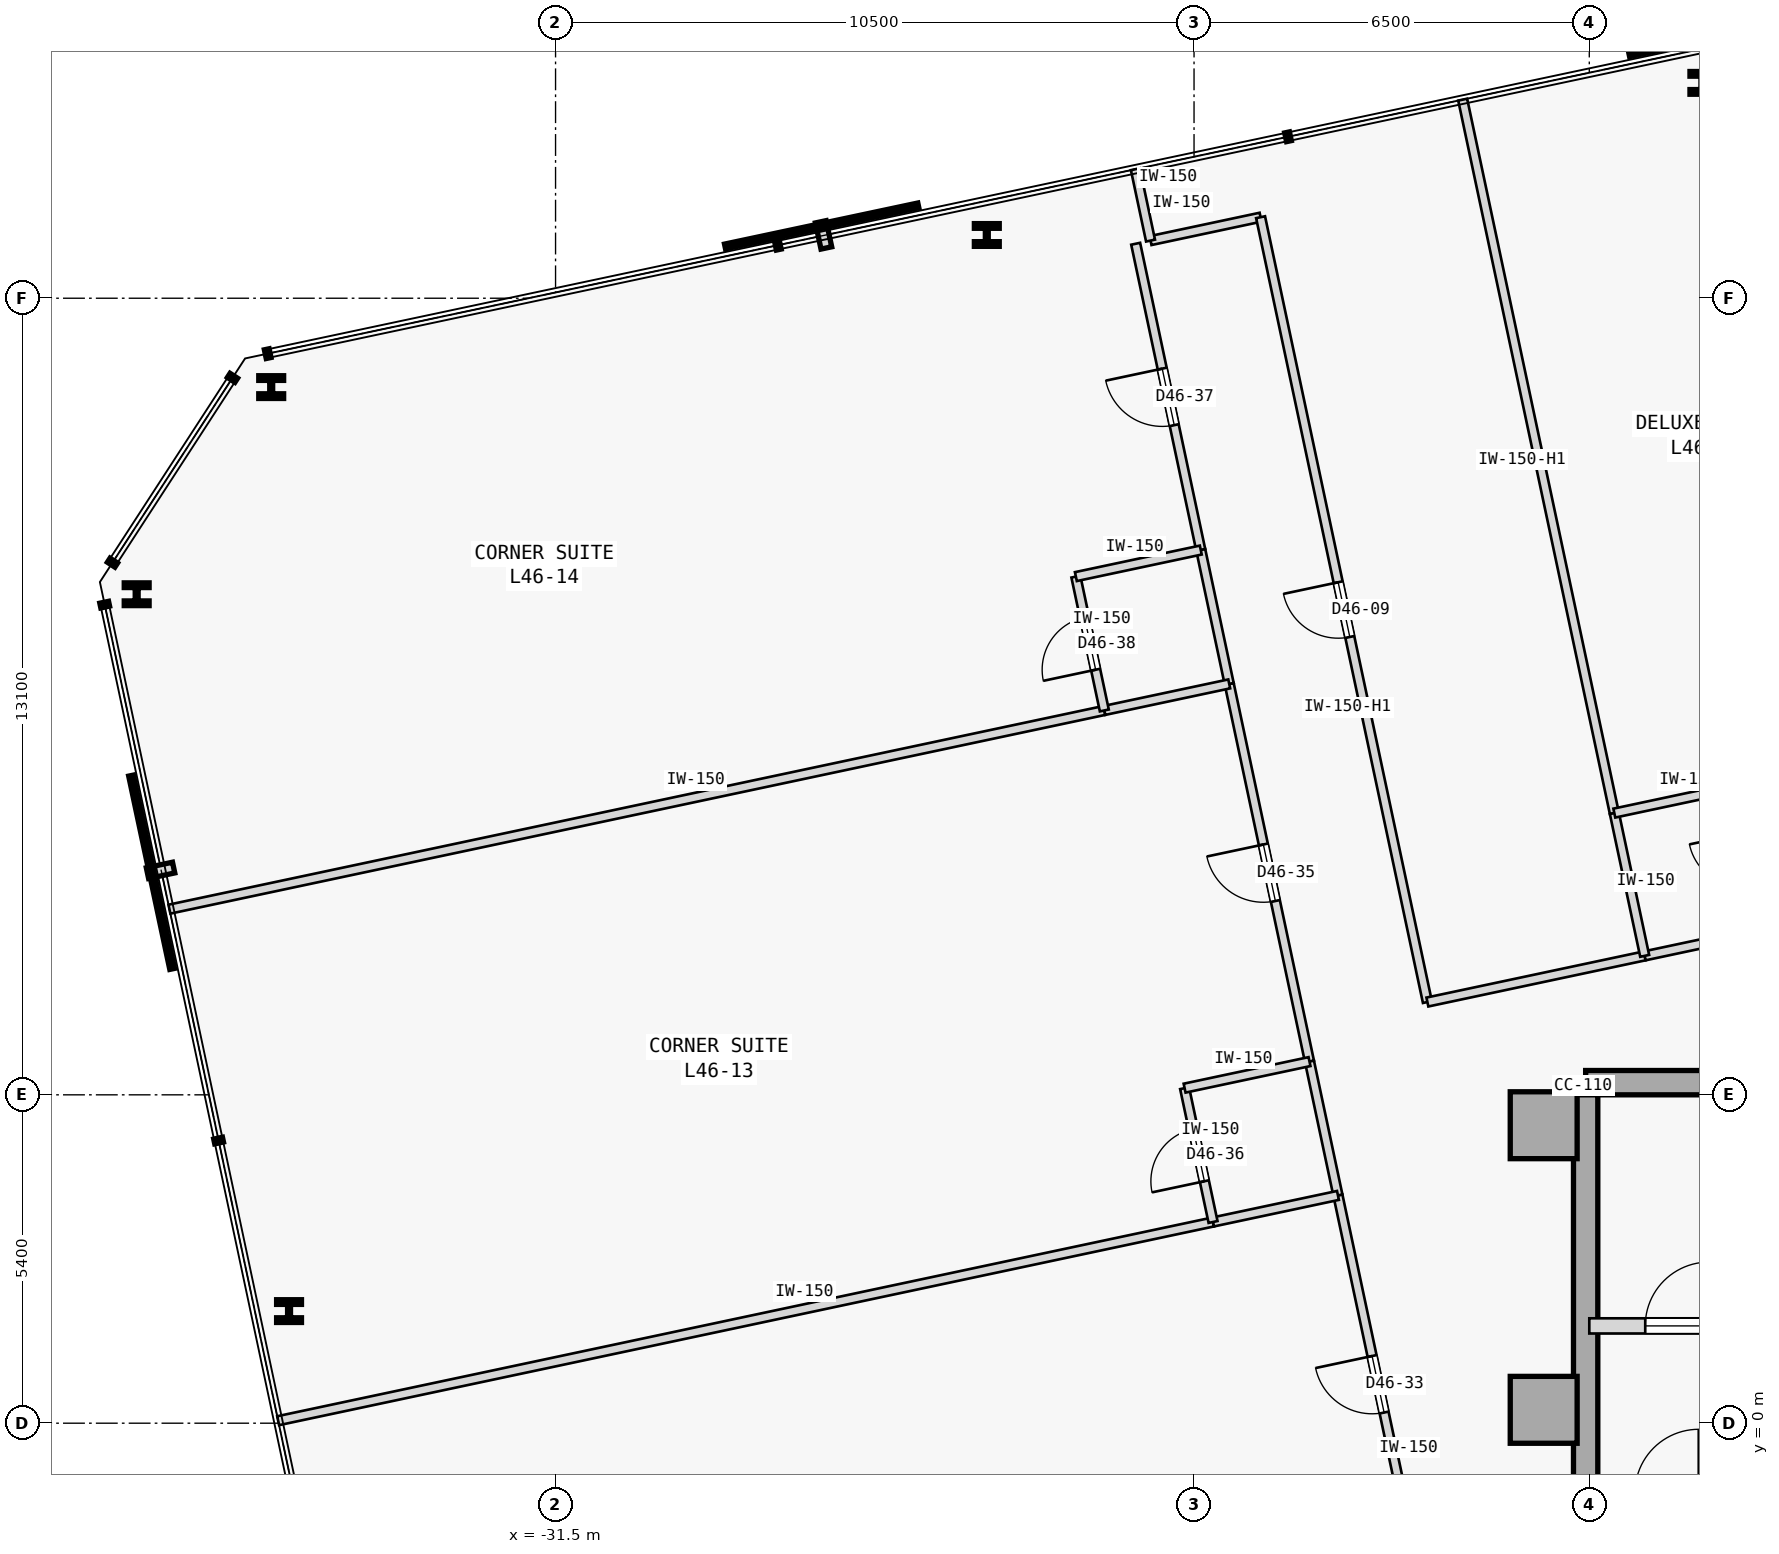
"""IFC4 building model, lengths in metres.
Left out: names, types, materials, properties, quantities, classifications, styles, units other than length and angle.
Written with IfcOpenShell. Run it as: python <this file> out.ifc"""

import sys

from ifc_helpers import new_model, si_unit, direction, frame, frame_2d, origin, origin_2d, place, context, subcontext, project, spatial, rectangle, i_section, extrude, element, fill, save


model = new_model("IFC4")
c1 = context("Model", 3, precision=1e-05, world=origin(), true_north=direction((0.0, 1.0)))
c2 = subcontext(c1, "Body", "Model", "MODEL_VIEW")
j1 = project(units=[si_unit("LENGTHUNIT", "METRE"), si_unit("PLANEANGLEUNIT", "RADIAN")], contexts=[c1])
p1 = place(None, origin())
s1 = spatial("IfcSite", under=j1, at=p1, CompositionType="ELEMENT")
p2 = place(p1, origin())
s2 = spatial("IfcBuilding", under=s1, at=p2, CompositionType="ELEMENT")
p3 = place(p2, frame((0.0, 0.0, 178.6)))
s3 = spatial("IfcBuildingStorey", under=s2, at=p3, CompositionType="ELEMENT", Elevation=178.6)
for number, where, z_axis, x_axis in (
    (1, (-15.25, 4.9, 0.0), (0.0, 0.0, 1.0), (1.0, 0.0, 0.0)),
    (2, (-15.25, 0.22, 0.0), (0.0, 0.0, 1.0), (1.0, 0.0, 0.0)),
):
    element("IfcColumn", number, at=place(p3, frame(where, z_axis=z_axis, x_axis=x_axis)), inside=s3, PredefinedType="COLUMN", context=c2, shape_type="SweptSolid", body=[
        extrude(rectangle(XDim=1.1, YDim=1.1, at=origin_2d()), origin(), (0.0, 0.0, 1.0), 3.4),
    ])
p4 = place(p3, frame((-14.56, 5.6, 0.0), z_axis=(0.0, 0.0, 1.0), x_axis=(1.0, 0.0, 0.0)))
e3 = element("IfcWall", 3, at=p4, inside=s3, PredefinedType="SHEAR", context=c2, shape_type="SweptSolid", body=[
    extrude(rectangle(XDim=11.41, YDim=0.4, at=frame_2d((5.705, 0.0))), origin(), (0.0, 0.0, 1.0), 3.175),
])
p5 = place(p3, frame((-14.56, -5.4, 0.0), z_axis=(0.0, 0.0, 1.0), x_axis=(0.0, 1.0, 0.0)))
e4 = element("IfcWall", 4, at=p5, inside=s3, PredefinedType="SHEAR", context=c2, shape_type="SweptSolid", body=[
    extrude(rectangle(XDim=10.8, YDim=0.4, at=frame_2d((5.4, 0.0))), origin(), (0.0, 0.0, 1.0), 3.175),
])
for number, where, z_axis, x_axis in (
    (5, (-12.64, 22.042, 0.0), (0.0, 0.0, 1.0), (1.0, 0.0, 0.0)),
    (6, (-24.408, 19.54, 0.0), (0.0, 0.0, 1.0), (1.0, 0.0, 0.0)),
    (7, (-36.176, 17.039, 0.0), (0.0, 0.0, 1.0), (1.0, 0.0, 0.0)),
    (8, (-38.389, 13.632, 0.0), (0.0, 0.0, 1.0), (1.0, 0.0, 0.0)),
    (9, (-35.883, 1.844, 0.0), (0.0, 0.0, 1.0), (1.0, 0.0, 0.0)),
):
    element("IfcColumn", number, at=place(p3, frame(where, z_axis=z_axis, x_axis=x_axis)), inside=s3, PredefinedType="COLUMN", context=c2, shape_type="SweptSolid", body=[
        extrude(i_section(OverallWidth=0.409, OverallDepth=0.374, WebThickness=0.048, FlangeThickness=0.077, FilletRadius=0.015, at=origin_2d()), origin(), (0.0, 0.0, 1.0), 3.4),
    ])
p6 = place(p3, frame((-14.5, 1.6, 0.0), z_axis=(0.0, 0.0, 1.0), x_axis=(1.0, 0.0, 0.0)))
e10 = element("IfcWall", 10, at=p6, inside=s3, PredefinedType="STANDARD", context=c2, shape_type="SweptSolid", body=[
    extrude(rectangle(XDim=3.6, YDim=0.25, at=frame_2d((1.8, 0.0))), origin(), (0.0, 0.0, 1.0), 3.175),
])
p7 = place(p6, frame((0.92, 0.0, 0.0)))
e11 = element("IfcOpeningElement", 11, at=p7, cuts=e10, PredefinedType="OPENING", context=c2, shape_type="SweptSolid", body=[
    extrude(rectangle(XDim=1.05, YDim=2.15, at=frame_2d((0.525, 1.075))), frame((0.0, 0.135, 0.0), z_axis=(0.0, -1.0, 0.0), x_axis=(1.0, 0.0, 0.0)), (0.0, 0.0, 1.0), 0.27),
])
p8 = place(p3, frame((-21.715, 19.448, 0.0), z_axis=(0.0, 0.0, 1.0), x_axis=(0.978160192495, 0.207852442415, 0.0)))
e12 = element("IfcWall", 12, at=p8, inside=s3, PredefinedType="PARTITIONING", context=c2, shape_type="SweptSolid", body=[
    extrude(rectangle(XDim=1.85, YDim=0.15, at=frame_2d((0.925, 0.0))), origin(), (0.0, 0.0, 1.0), 3.175),
])
p9 = place(p3, frame((-17.162, 6.926, 0.0), z_axis=(0.0, 0.0, 1.0), x_axis=(-0.207911421929, 0.978147657888, 0.0)))
e13 = element("IfcWall", 13, at=p9, inside=s3, PredefinedType="PARTITIONING", context=c2, shape_type="SweptSolid", body=[
    extrude(rectangle(XDim=13.195, YDim=0.15, at=frame_2d((6.598, 0.0))), origin(), (0.0, 0.0, 1.0), 2.725),
])
p10 = place(p9, frame((6.137, 0.0, 0.0)))
e14 = element("IfcOpeningElement", 14, at=p10, cuts=e13, PredefinedType="OPENING", context=c2, shape_type="SweptSolid", body=[
    extrude(rectangle(XDim=0.92, YDim=2.15, at=frame_2d((0.46, 1.075))), frame((0.0, 0.085, 0.0), z_axis=(0.0, -1.0, 0.0), x_axis=(1.0, 0.0, 0.0)), (0.0, 0.0, 1.0), 0.17),
])
p11 = place(p3, frame((-17.162, 6.926, 0.0), z_axis=(0.0, 0.0, 1.0), x_axis=(0.978147299501, 0.207913108004, 0.0)))
e15 = element("IfcWall", 15, at=p11, inside=s3, PredefinedType="PARTITIONING", context=c2, shape_type="SweptSolid", body=[
    extrude(rectangle(XDim=3.653, YDim=0.15, at=frame_2d((1.827, 0.0))), origin(), (0.0, 0.0, 1.0), 3.175),
])
p12 = place(p3, frame((-13.589, 7.685, 0.0), z_axis=(0.0, 0.0, 1.0), x_axis=(0.97811873796, 0.208047433175, 0.0)))
e16 = element("IfcWall", 16, at=p12, inside=s3, PredefinedType="PARTITIONING", context=c2, shape_type="SweptSolid", body=[
    extrude(rectangle(XDim=1.981, YDim=0.15, at=frame_2d((0.99, 0.0))), origin(), (0.0, 0.0, 1.0), 3.175),
])
p13 = place(p3, frame((-17.313, -2.466, 0.0), z_axis=(0.0, 0.0, 1.0), x_axis=(-0.207916691923, 0.978146537703, 0.0)))
e17 = element("IfcWall", 17, at=p13, inside=s3, PredefinedType="PARTITIONING", context=c2, shape_type="SweptSolid", body=[
    extrude(rectangle(XDim=6.35, YDim=0.15, at=frame_2d((3.175, 0.0))), origin(), (0.0, 0.0, 1.0), 3.175),
])
p14 = place(p13, frame((2.7, 0.0, 0.0)))
e18 = element("IfcOpeningElement", 18, at=p14, cuts=e17, PredefinedType="OPENING", context=c2, shape_type="SweptSolid", body=[
    extrude(rectangle(XDim=0.95, YDim=2.15, at=frame_2d((0.475, 1.075))), frame((0.0, 0.085, 0.0), z_axis=(0.0, -1.0, 0.0), x_axis=(1.0, 0.0, 0.0)), (0.0, 0.0, 1.0), 0.17),
])
p15 = place(p3, frame((-19.101, 5.946, 0.0), z_axis=(0.0, 0.0, 1.0), x_axis=(-0.207916691923, 0.978146537703, 0.0)))
e19 = element("IfcWall", 19, at=p15, inside=s3, PredefinedType="PARTITIONING", context=c2, shape_type="SweptSolid", body=[
    extrude(rectangle(XDim=6.35, YDim=0.15, at=frame_2d((3.175, 0.0))), origin(), (0.0, 0.0, 1.0), 3.175),
])
p16 = place(p15, frame((2.7, 0.0, 0.0)))
e20 = element("IfcOpeningElement", 20, at=p16, cuts=e19, PredefinedType="OPENING", context=c2, shape_type="SweptSolid", body=[
    extrude(rectangle(XDim=0.95, YDim=2.15, at=frame_2d((0.475, 1.075))), frame((0.0, 0.085, 0.0), z_axis=(0.0, -1.0, 0.0), x_axis=(1.0, 0.0, 0.0)), (0.0, 0.0, 1.0), 0.17),
])
p17 = place(p3, frame((-18.633, 3.746, 0.0), z_axis=(0.0, 0.0, 1.0), x_axis=(-0.207913264065, 0.978147266328, 0.0)))
e21 = element("IfcWall", 21, at=p17, inside=s3, PredefinedType="PARTITIONING", context=c2, shape_type="SweptSolid", body=[
    extrude(rectangle(XDim=2.25, YDim=0.15, at=frame_2d((1.125, 0.0))), origin(), (0.0, 0.0, 1.0), 3.175),
])
p18 = place(p3, frame((-20.889, 14.358, 0.0), z_axis=(0.0, 0.0, 1.0), x_axis=(-0.207916584961, 0.978146560439, 0.0)))
e22 = element("IfcWall", 22, at=p18, inside=s3, PredefinedType="PARTITIONING", context=c2, shape_type="SweptSolid", body=[
    extrude(rectangle(XDim=5.15, YDim=0.15, at=frame_2d((2.575, 0.0))), origin(), (0.0, 0.0, 1.0), 3.175),
])
p19 = place(p18, frame((2.1, 0.0, 0.0)))
e23 = element("IfcOpeningElement", 23, at=p19, cuts=e22, PredefinedType="OPENING", context=c2, shape_type="SweptSolid", body=[
    extrude(rectangle(XDim=0.95, YDim=2.15, at=frame_2d((0.475, 1.075))), frame((0.0, 0.085, 0.0), z_axis=(0.0, -1.0, 0.0), x_axis=(1.0, 0.0, 0.0)), (0.0, 0.0, 1.0), 0.17),
])
p20 = place(p3, frame((-20.421, 12.158, 0.0), z_axis=(0.0, 0.0, 1.0), x_axis=(-0.207913264065, 0.978147266328, 0.0)))
e24 = element("IfcWall", 24, at=p20, inside=s3, PredefinedType="PARTITIONING", context=c2, shape_type="SweptSolid", body=[
    extrude(rectangle(XDim=2.25, YDim=0.15, at=frame_2d((1.125, 0.0))), origin(), (0.0, 0.0, 1.0), 3.175),
])
p21 = place(p3, frame((-14.088, 10.033, 0.0), z_axis=(0.0, 0.0, 1.0), x_axis=(-0.207910848762, 0.978147779718, 0.0)))
e25 = element("IfcWall", 25, at=p21, inside=s3, PredefinedType="PARTITIONING", context=c2, shape_type="SweptSolid", body=[
    extrude(rectangle(XDim=11.995, YDim=0.15, at=frame_2d((5.998, 0.0))), origin(), (0.0, 0.0, 1.0), 2.725),
])
p22 = place(p3, frame((-13.589, 7.685, 0.0), z_axis=(0.0, 0.0, 1.0), x_axis=(-0.207917150959, 0.978146440129, 0.0)))
e26 = element("IfcWall", 26, at=p22, inside=s3, PredefinedType="PARTITIONING", context=c2, shape_type="SweptSolid", body=[
    extrude(rectangle(XDim=2.4, YDim=0.15, at=frame_2d((1.2, 0.0))), origin(), (0.0, 0.0, 1.0), 3.175),
])
p23 = place(p3, frame((-21.715, 19.448, 0.0), z_axis=(0.0, 0.0, 1.0), x_axis=(-0.20795853359, 0.978137642823, 0.0)))
e27 = element("IfcWall", 27, at=p23, inside=s3, PredefinedType="PARTITIONING", context=c2, shape_type="SweptSolid", body=[
    extrude(rectangle(XDim=1.2, YDim=0.15, at=frame_2d((0.6, 0.0))), origin(), (0.0, 0.0, 1.0), 3.175),
])
p24 = place(p3, frame((-14.088, 10.033, 0.0), z_axis=(0.0, 0.0, 1.0), x_axis=(0.978149140323, 0.20790444749, 0.0)))
e28 = element("IfcWall", 28, at=p24, inside=s3, PredefinedType="PARTITIONING", context=c2, shape_type="SweptSolid", body=[
    extrude(rectangle(XDim=1.981, YDim=0.15, at=frame_2d((0.99, 0.0))), origin(), (0.0, 0.0, 1.0), 3.175),
])
p25 = place(p3, frame((-36.062, 0.041, 0.0), z_axis=(0.0, 0.0, 1.0), x_axis=(0.978149296727, 0.207903711638, 0.0)))
e29 = element("IfcWall", 29, at=p25, inside=s3, PredefinedType="PARTITIONING", context=c2, shape_type="SweptSolid", body=[
    extrude(rectangle(XDim=15.718, YDim=0.15, at=frame_2d((7.859, 0.0))), origin(), (0.0, 0.0, 1.0), 3.175),
])
p26 = place(p3, frame((-20.688, 3.309, 0.0), z_axis=(0.0, 0.0, 1.0), x_axis=(0.978134617382, 0.207972763311, 0.0)))
e30 = element("IfcWall", 30, at=p26, inside=s3, PredefinedType="PARTITIONING", context=c2, shape_type="SweptSolid", body=[
    extrude(rectangle(XDim=2.1, YDim=0.15, at=frame_2d((1.05, 0.0))), origin(), (0.0, 0.0, 1.0), 3.175),
])
p27 = place(p3, frame((-20.688, 3.309, 0.0), z_axis=(0.0, 0.0, 1.0), x_axis=(-0.207891197838, 0.978151956427, 0.0)))
e31 = element("IfcWall", 31, at=p27, inside=s3, PredefinedType="PARTITIONING", context=c2, shape_type="SweptSolid", body=[
    extrude(rectangle(XDim=2.25, YDim=0.15, at=frame_2d((1.125, 0.0))), origin(), (0.0, 0.0, 1.0), 3.175),
])
p28 = place(p27, frame((0.685, 0.0, 0.0)))
e32 = element("IfcOpeningElement", 32, at=p28, cuts=e31, PredefinedType="OPENING", context=c2, shape_type="SweptSolid", body=[
    extrude(rectangle(XDim=0.88, YDim=2.15, at=frame_2d((0.44, 1.075))), frame((0.0, 0.085, 0.0), z_axis=(0.0, -1.0, 0.0), x_axis=(1.0, 0.0, 0.0)), (0.0, 0.0, 1.0), 0.17),
])
p29 = place(p3, frame((-21.155, 5.51, 0.0), z_axis=(0.0, 0.0, 1.0), x_axis=(0.97815826, 0.207861536591, 0.0)))
e33 = element("IfcWall", 33, at=p29, inside=s3, PredefinedType="PARTITIONING", context=c2, shape_type="SweptSolid", body=[
    extrude(rectangle(XDim=2.1, YDim=0.15, at=frame_2d((1.05, 0.0))), origin(), (0.0, 0.0, 1.0), 3.175),
])
p30 = place(p3, frame((-37.85, 8.453, 0.0), z_axis=(0.0, 0.0, 1.0), x_axis=(0.978149296727, 0.207903711638, 0.0)))
e34 = element("IfcWall", 34, at=p30, inside=s3, PredefinedType="PARTITIONING", context=c2, shape_type="SweptSolid", body=[
    extrude(rectangle(XDim=15.718, YDim=0.15, at=frame_2d((7.859, 0.0))), origin(), (0.0, 0.0, 1.0), 3.175),
])
p31 = place(p3, frame((-22.476, 11.721, 0.0), z_axis=(0.0, 0.0, 1.0), x_axis=(0.978134617382, 0.207972763311, 0.0)))
e35 = element("IfcWall", 35, at=p31, inside=s3, PredefinedType="PARTITIONING", context=c2, shape_type="SweptSolid", body=[
    extrude(rectangle(XDim=2.1, YDim=0.15, at=frame_2d((1.05, 0.0))), origin(), (0.0, 0.0, 1.0), 3.175),
])
p32 = place(p3, frame((-22.476, 11.721, 0.0), z_axis=(0.0, 0.0, 1.0), x_axis=(-0.207891197838, 0.978151956427, 0.0)))
e36 = element("IfcWall", 36, at=p32, inside=s3, PredefinedType="PARTITIONING", context=c2, shape_type="SweptSolid", body=[
    extrude(rectangle(XDim=2.25, YDim=0.15, at=frame_2d((1.125, 0.0))), origin(), (0.0, 0.0, 1.0), 3.175),
])
p33 = place(p32, frame((0.685, 0.0, 0.0)))
e37 = element("IfcOpeningElement", 37, at=p33, cuts=e36, PredefinedType="OPENING", context=c2, shape_type="SweptSolid", body=[
    extrude(rectangle(XDim=0.88, YDim=2.15, at=frame_2d((0.44, 1.075))), frame((0.0, 0.085, 0.0), z_axis=(0.0, -1.0, 0.0), x_axis=(1.0, 0.0, 0.0)), (0.0, 0.0, 1.0), 0.17),
])
p34 = place(p3, frame((-22.943, 13.922, 0.0), z_axis=(0.0, 0.0, 1.0), x_axis=(0.97815826, 0.207861536591, 0.0)))
e38 = element("IfcWall", 38, at=p34, inside=s3, PredefinedType="PARTITIONING", context=c2, shape_type="SweptSolid", body=[
    extrude(rectangle(XDim=2.1, YDim=0.15, at=frame_2d((1.05, 0.0))), origin(), (0.0, 0.0, 1.0), 3.175),
])
p35 = place(p7, origin())
e39 = element("IfcDoor", 39, at=p35, inside=s3, OperationType="SINGLE_SWING_RIGHT", PredefinedType="DOOR", context=c2, shape_type="SweptSolid", body=[
    extrude(rectangle(XDim=1.05, YDim=2.15, at=frame_2d((0.525, 1.075))), frame((0.0, 0.025, 0.0), z_axis=(0.0, -1.0, 0.0), x_axis=(1.0, 0.0, 0.0)), (0.0, 0.0, 1.0), 0.05),
])
fill(e11, e39)
p36 = place(p10, origin())
e40 = element("IfcDoor", 40, at=p36, inside=s3, OperationType="SINGLE_SWING_RIGHT", PredefinedType="DOOR", context=c2, shape_type="SweptSolid", body=[
    extrude(rectangle(XDim=0.92, YDim=2.15, at=frame_2d((0.46, 1.075))), frame((0.0, 0.025, 0.0), z_axis=(0.0, -1.0, 0.0), x_axis=(1.0, 0.0, 0.0)), (0.0, 0.0, 1.0), 0.05),
])
fill(e14, e40)
p37 = place(p14, origin())
e41 = element("IfcDoor", 41, at=p37, inside=s3, OperationType="SINGLE_SWING_RIGHT", PredefinedType="DOOR", context=c2, shape_type="SweptSolid", body=[
    extrude(rectangle(XDim=0.95, YDim=2.15, at=frame_2d((0.475, 1.075))), frame((0.0, 0.025, 0.0), z_axis=(0.0, -1.0, 0.0), x_axis=(1.0, 0.0, 0.0)), (0.0, 0.0, 1.0), 0.05),
])
fill(e18, e41)
p38 = place(p16, origin())
e42 = element("IfcDoor", 42, at=p38, inside=s3, OperationType="SINGLE_SWING_RIGHT", PredefinedType="DOOR", context=c2, shape_type="SweptSolid", body=[
    extrude(rectangle(XDim=0.95, YDim=2.15, at=frame_2d((0.475, 1.075))), frame((0.0, 0.025, 0.0), z_axis=(0.0, -1.0, 0.0), x_axis=(1.0, 0.0, 0.0)), (0.0, 0.0, 1.0), 0.05),
])
fill(e20, e42)
p39 = place(p28, origin())
e43 = element("IfcDoor", 43, at=p39, inside=s3, OperationType="SINGLE_SWING_LEFT", PredefinedType="DOOR", context=c2, shape_type="SweptSolid", body=[
    extrude(rectangle(XDim=0.88, YDim=2.15, at=frame_2d((0.44, 1.075))), frame((0.0, 0.025, 0.0), z_axis=(0.0, -1.0, 0.0), x_axis=(1.0, 0.0, 0.0)), (0.0, 0.0, 1.0), 0.05),
])
fill(e32, e43)
p40 = place(p19, origin())
e44 = element("IfcDoor", 44, at=p40, inside=s3, OperationType="SINGLE_SWING_RIGHT", PredefinedType="DOOR", context=c2, shape_type="SweptSolid", body=[
    extrude(rectangle(XDim=0.95, YDim=2.15, at=frame_2d((0.475, 1.075))), frame((0.0, 0.025, 0.0), z_axis=(0.0, -1.0, 0.0), x_axis=(1.0, 0.0, 0.0)), (0.0, 0.0, 1.0), 0.05),
])
fill(e23, e44)
p41 = place(p33, origin())
e45 = element("IfcDoor", 45, at=p41, inside=s3, OperationType="SINGLE_SWING_LEFT", PredefinedType="DOOR", context=c2, shape_type="SweptSolid", body=[
    extrude(rectangle(XDim=0.88, YDim=2.15, at=frame_2d((0.44, 1.075))), frame((0.0, 0.025, 0.0), z_axis=(0.0, -1.0, 0.0), x_axis=(1.0, 0.0, 0.0)), (0.0, 0.0, 1.0), 0.05),
])
fill(e37, e45)
save(model, sys.argv[1])
